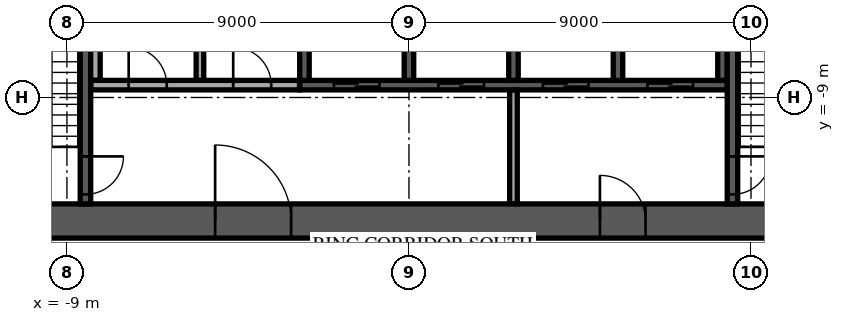
"""IFC4 building model, lengths in metres.
Left out: names, types, materials, properties, quantities, classifications, styles, units other than length and angle.
Written with IfcOpenShell. Run it as: python <this file> out.ifc"""

import sys

from ifc_helpers import new_model, si_unit, direction, frame, frame_2d, origin, place, context, subcontext, project, spatial, rectangle, extrude, element, fill, save


model = new_model("IFC4")
c1 = context("Model", 3, precision=1e-05, world=origin(), true_north=direction((0.0, 1.0)))
c2 = subcontext(c1, "Body", "Model", "MODEL_VIEW")
j1 = project(units=[si_unit("LENGTHUNIT", "METRE"), si_unit("PLANEANGLEUNIT", "RADIAN")], contexts=[c1])
p1 = place(None, origin())
s1 = spatial("IfcSite", under=j1, at=p1, CompositionType="ELEMENT")
p2 = place(p1, origin())
s2 = spatial("IfcBuilding", under=s1, at=p2, CompositionType="ELEMENT")
p3 = place(p2, frame((0.0, 0.0, 225.3)))
s3 = spatial("IfcBuildingStorey", under=s2, at=p3, CompositionType="ELEMENT", Elevation=225.3)
p4 = place(p3, frame((-12.7, -12.25, 0.0), z_axis=(0.0, 0.0, 1.0), x_axis=(1.0, 0.0, 0.0)))
e1 = element("IfcWall", 1, at=p4, inside=s3, PredefinedType="SHEAR", context=c2, shape_type="SweptSolid", body=[
    extrude(rectangle(XDim=25.4, YDim=0.9, at=frame_2d((12.7, 0.0))), origin(), (0.0, 0.0, 1.0), 3.62),
])
p5 = place(p4, frame((7.6, 0.0, 0.0)))
e2 = element("IfcOpeningElement", 2, at=p5, cuts=e1, PredefinedType="OPENING", context=c2, shape_type="SweptSolid", body=[
    extrude(rectangle(XDim=2.0, YDim=2.1, at=frame_2d((1.0, 1.05))), frame((0.0, 0.46, 0.0), z_axis=(0.0, -1.0, 0.0), x_axis=(1.0, 0.0, 0.0)), (0.0, 0.0, 1.0), 0.92),
])
p6 = place(p4, frame((17.725, 0.0, 0.0)))
e3 = element("IfcOpeningElement", 3, at=p6, cuts=e1, PredefinedType="OPENING", context=c2, shape_type="SweptSolid", body=[
    extrude(rectangle(XDim=1.2, YDim=2.1, at=frame_2d((0.6, 1.05))), frame((0.0, 0.46, 0.0), z_axis=(0.0, -1.0, 0.0), x_axis=(1.0, 0.0, 0.0)), (0.0, 0.0, 1.0), 0.92),
])
p7 = place(p4, frame((1.875, 0.0, 0.0)))
e4 = element("IfcOpeningElement", 4, at=p7, cuts=e1, PredefinedType="OPENING", context=c2, shape_type="SweptSolid", body=[
    extrude(rectangle(XDim=1.2, YDim=2.1, at=frame_2d((0.6, 1.05))), frame((0.0, 0.46, 0.0), z_axis=(0.0, -1.0, 0.0), x_axis=(1.0, 0.0, 0.0)), (0.0, 0.0, 1.0), 0.92),
])
p8 = place(p4, frame((22.325, 0.0, 0.0)))
e5 = element("IfcOpeningElement", 5, at=p8, cuts=e1, PredefinedType="OPENING", context=c2, shape_type="SweptSolid", body=[
    extrude(rectangle(XDim=1.2, YDim=2.1, at=frame_2d((0.6, 1.05))), frame((0.0, 0.46, 0.0), z_axis=(0.0, -1.0, 0.0), x_axis=(1.0, 0.0, 0.0)), (0.0, 0.0, 1.0), 0.92),
])
p9 = place(p3, frame((-2.875, -8.675, 0.0), z_axis=(0.0, 0.0, 1.0), x_axis=(1.0, 0.0, 0.0)))
e6 = element("IfcWall", 6, at=p9, inside=s3, PredefinedType="SOLIDWALL", context=c2, shape_type="SweptSolid", body=[
    extrude(rectangle(XDim=11.25, YDim=0.25, at=frame_2d((5.625, 0.0))), origin(), (0.0, 0.0, 1.0), 3.62),
])
p10 = place(p9, frame((0.9, 0.0, 0.0)))
e7 = element("IfcOpeningElement", 7, at=p10, cuts=e6, PredefinedType="OPENING", context=c2, shape_type="SweptSolid", body=[
    extrude(rectangle(XDim=1.2, YDim=2.1, at=frame_2d((0.6, 1.05))), frame((0.0, 0.135, 0.0), z_axis=(0.0, -1.0, 0.0), x_axis=(1.0, 0.0, 0.0)), (0.0, 0.0, 1.0), 0.27),
])
p11 = place(p9, frame((3.65, 0.0, 0.0)))
e8 = element("IfcOpeningElement", 8, at=p11, cuts=e6, PredefinedType="OPENING", context=c2, shape_type="SweptSolid", body=[
    extrude(rectangle(XDim=1.2, YDim=2.1, at=frame_2d((0.6, 1.05))), frame((0.0, 0.135, 0.0), z_axis=(0.0, -1.0, 0.0), x_axis=(1.0, 0.0, 0.0)), (0.0, 0.0, 1.0), 0.27),
])
p12 = place(p9, frame((6.4, 0.0, 0.0)))
e9 = element("IfcOpeningElement", 9, at=p12, cuts=e6, PredefinedType="OPENING", context=c2, shape_type="SweptSolid", body=[
    extrude(rectangle(XDim=1.2, YDim=2.1, at=frame_2d((0.6, 1.05))), frame((0.0, 0.135, 0.0), z_axis=(0.0, -1.0, 0.0), x_axis=(1.0, 0.0, 0.0)), (0.0, 0.0, 1.0), 0.27),
])
p13 = place(p9, frame((9.15, 0.0, 0.0)))
e10 = element("IfcOpeningElement", 10, at=p13, cuts=e6, PredefinedType="OPENING", context=c2, shape_type="SweptSolid", body=[
    extrude(rectangle(XDim=1.2, YDim=2.1, at=frame_2d((0.6, 1.05))), frame((0.0, 0.135, 0.0), z_axis=(0.0, -1.0, 0.0), x_axis=(1.0, 0.0, 0.0)), (0.0, 0.0, 1.0), 0.27),
])
for number, where, z_axis, x_axis in (
    (11, (-2.75, -8.55, 0.0), (0.0, 0.0, 1.0), (0.0, 1.0, 0.0)),
    (12, (0.0, -8.55, 0.0), (0.0, 0.0, 1.0), (0.0, 1.0, 0.0)),
    (13, (2.75, -8.55, 0.0), (0.0, 0.0, 1.0), (0.0, 1.0, 0.0)),
    (14, (5.5, -8.55, 0.0), (0.0, 0.0, 1.0), (0.0, 1.0, 0.0)),
    (15, (8.25, -8.55, 0.0), (0.0, 0.0, 1.0), (0.0, 1.0, 0.0)),
):
    element("IfcWall", number, at=place(p3, frame(where, z_axis=z_axis, x_axis=x_axis)), inside=s3, PredefinedType="SOLIDWALL", context=c2, shape_type="SweptSolid", body=[
        extrude(rectangle(XDim=2.7, YDim=0.25, at=frame_2d((1.35, 0.0))), origin(), (0.0, 0.0, 1.0), 3.62),
    ])
p14 = place(p3, frame((-8.512, -4.55, 0.0), z_axis=(0.0, 0.0, 1.0), x_axis=(0.0, -1.0, 0.0)))
e16 = element("IfcWall", 16, at=p14, inside=s3, PredefinedType="SOLIDWALL", context=c2, shape_type="SweptSolid", body=[
    extrude(rectangle(XDim=7.25, YDim=0.275, at=frame_2d((3.625, 0.0))), origin(), (0.0, 0.0, 1.0), 3.62),
])
p15 = place(p14, frame((6.0, 0.0, 0.0)))
e17 = element("IfcOpeningElement", 17, at=p15, cuts=e16, PredefinedType="OPENING", context=c2, shape_type="SweptSolid", body=[
    extrude(rectangle(XDim=1.0, YDim=2.1, at=frame_2d((0.5, 1.05))), frame((0.0, 0.147, 0.0), z_axis=(0.0, -1.0, 0.0), x_axis=(1.0, 0.0, 0.0)), (0.0, 0.0, 1.0), 0.295),
])
p16 = place(p3, frame((8.512, -4.55, 0.0), z_axis=(0.0, 0.0, 1.0), x_axis=(0.0, -1.0, 0.0)))
e18 = element("IfcWall", 18, at=p16, inside=s3, PredefinedType="SOLIDWALL", context=c2, shape_type="SweptSolid", body=[
    extrude(rectangle(XDim=7.25, YDim=0.275, at=frame_2d((3.625, 0.0))), origin(), (0.0, 0.0, 1.0), 3.62),
])
p17 = place(p16, frame((6.0, 0.0, 0.0)))
e19 = element("IfcOpeningElement", 19, at=p17, cuts=e18, PredefinedType="OPENING", context=c2, shape_type="SweptSolid", body=[
    extrude(rectangle(XDim=1.0, YDim=2.1, at=frame_2d((0.5, 1.05))), frame((0.0, 0.147, 0.0), z_axis=(0.0, -1.0, 0.0), x_axis=(1.0, 0.0, 0.0)), (0.0, 0.0, 1.0), 0.295),
])
p18 = place(p3, frame((2.75, -11.795, 0.0), z_axis=(0.0, 0.0, 1.0), x_axis=(0.0, 1.0, 0.0)))
e20 = element("IfcWall", 20, at=p18, inside=s3, PredefinedType="PARTITIONING", context=c2, shape_type="SweptSolid", body=[
    extrude(rectangle(XDim=2.99, YDim=0.2, at=frame_2d((1.495, 0.0))), origin(), (0.0, 0.0, 1.0), 3.62),
])
p19 = place(p3, frame((-8.37, -8.675, 0.0), z_axis=(0.0, 0.0, 1.0), x_axis=(1.0, 0.0, 0.0)))
e21 = element("IfcWall", 21, at=p19, inside=s3, PredefinedType="PARTITIONING", context=c2, shape_type="SweptSolid", body=[
    extrude(rectangle(XDim=5.49, YDim=0.25, at=frame_2d((2.745, 0.0))), origin(), (0.0, 0.0, 1.0), 3.62),
])
p20 = place(p19, frame((0.995, 0.0, 0.0)))
e22 = element("IfcOpeningElement", 22, at=p20, cuts=e21, PredefinedType="OPENING", context=c2, shape_type="SweptSolid", body=[
    extrude(rectangle(XDim=1.0, YDim=2.1, at=frame_2d((0.5, 1.05))), frame((0.0, 0.135, 0.0), z_axis=(0.0, -1.0, 0.0), x_axis=(1.0, 0.0, 0.0)), (0.0, 0.0, 1.0), 0.27),
])
p21 = place(p19, frame((3.745, 0.0, 0.0)))
e23 = element("IfcOpeningElement", 23, at=p21, cuts=e21, PredefinedType="OPENING", context=c2, shape_type="SweptSolid", body=[
    extrude(rectangle(XDim=1.0, YDim=2.1, at=frame_2d((0.5, 1.05))), frame((0.0, 0.135, 0.0), z_axis=(0.0, -1.0, 0.0), x_axis=(1.0, 0.0, 0.0)), (0.0, 0.0, 1.0), 0.27),
])
p22 = place(p3, frame((-8.25, -8.545, 0.0), z_axis=(0.0, 0.0, 1.0), x_axis=(0.0, 1.0, 0.0)))
e24 = element("IfcWall", 24, at=p22, inside=s3, PredefinedType="PARTITIONING", context=c2, shape_type="SweptSolid", body=[
    extrude(rectangle(XDim=2.69, YDim=0.25, at=frame_2d((1.345, 0.0))), origin(), (0.0, 0.0, 1.0), 3.62),
])
p23 = place(p3, frame((-5.5, -8.545, 0.0), z_axis=(0.0, 0.0, 1.0), x_axis=(0.0, 1.0, 0.0)))
e25 = element("IfcWall", 25, at=p23, inside=s3, PredefinedType="PARTITIONING", context=c2, shape_type="SweptSolid", body=[
    extrude(rectangle(XDim=2.69, YDim=0.2, at=frame_2d((1.345, 0.0))), origin(), (0.0, 0.0, 1.0), 3.62),
])
p24 = place(p3, frame((-33.845, -10.81, 0.0), z_axis=(0.0, 0.0, 1.0), x_axis=(0.777145437972, -0.629321037499, 0.0)))
e26 = element("IfcWall", 26, at=p24, inside=s3, PredefinedType="STANDARD", context=c2, shape_type="SweptSolid", body=[
    extrude(rectangle(XDim=39.0, YDim=0.6, at=frame_2d((19.5, 0.0))), origin(), (0.0, 0.0, 1.0), 3.62),
])
p25 = place(p24, frame((1.217, 0.0, 0.9)))
e27 = element("IfcOpeningElement", 27, at=p25, cuts=e26, PredefinedType="OPENING", context=c2, shape_type="SweptSolid", body=[
    extrude(rectangle(XDim=1.9, YDim=2.1, at=frame_2d((0.95, 1.05))), frame((0.0, 0.31, 0.0), z_axis=(0.0, -1.0, 0.0), x_axis=(1.0, 0.0, 0.0)), (0.0, 0.0, 1.0), 0.62),
])
p26 = place(p24, frame((5.55, 0.0, 0.9)))
e28 = element("IfcOpeningElement", 28, at=p26, cuts=e26, PredefinedType="OPENING", context=c2, shape_type="SweptSolid", body=[
    extrude(rectangle(XDim=1.9, YDim=2.1, at=frame_2d((0.95, 1.05))), frame((0.0, 0.31, 0.0), z_axis=(0.0, -1.0, 0.0), x_axis=(1.0, 0.0, 0.0)), (0.0, 0.0, 1.0), 0.62),
])
p27 = place(p24, frame((9.883, 0.0, 0.9)))
e29 = element("IfcOpeningElement", 29, at=p27, cuts=e26, PredefinedType="OPENING", context=c2, shape_type="SweptSolid", body=[
    extrude(rectangle(XDim=1.9, YDim=2.1, at=frame_2d((0.95, 1.05))), frame((0.0, 0.31, 0.0), z_axis=(0.0, -1.0, 0.0), x_axis=(1.0, 0.0, 0.0)), (0.0, 0.0, 1.0), 0.62),
])
p28 = place(p24, frame((14.217, 0.0, 0.9)))
e30 = element("IfcOpeningElement", 30, at=p28, cuts=e26, PredefinedType="OPENING", context=c2, shape_type="SweptSolid", body=[
    extrude(rectangle(XDim=1.9, YDim=2.1, at=frame_2d((0.95, 1.05))), frame((0.0, 0.31, 0.0), z_axis=(0.0, -1.0, 0.0), x_axis=(1.0, 0.0, 0.0)), (0.0, 0.0, 1.0), 0.62),
])
p29 = place(p24, frame((18.55, 0.0, 0.9)))
e31 = element("IfcOpeningElement", 31, at=p29, cuts=e26, PredefinedType="OPENING", context=c2, shape_type="SweptSolid", body=[
    extrude(rectangle(XDim=1.9, YDim=2.1, at=frame_2d((0.95, 1.05))), frame((0.0, 0.31, 0.0), z_axis=(0.0, -1.0, 0.0), x_axis=(1.0, 0.0, 0.0)), (0.0, 0.0, 1.0), 0.62),
])
p30 = place(p24, frame((22.883, 0.0, 0.9)))
e32 = element("IfcOpeningElement", 32, at=p30, cuts=e26, PredefinedType="OPENING", context=c2, shape_type="SweptSolid", body=[
    extrude(rectangle(XDim=1.9, YDim=2.1, at=frame_2d((0.95, 1.05))), frame((0.0, 0.31, 0.0), z_axis=(0.0, -1.0, 0.0), x_axis=(1.0, 0.0, 0.0)), (0.0, 0.0, 1.0), 0.62),
])
p31 = place(p24, frame((27.217, 0.0, 0.9)))
e33 = element("IfcOpeningElement", 33, at=p31, cuts=e26, PredefinedType="OPENING", context=c2, shape_type="SweptSolid", body=[
    extrude(rectangle(XDim=1.9, YDim=2.1, at=frame_2d((0.95, 1.05))), frame((0.0, 0.31, 0.0), z_axis=(0.0, -1.0, 0.0), x_axis=(1.0, 0.0, 0.0)), (0.0, 0.0, 1.0), 0.62),
])
p32 = place(p24, frame((31.55, 0.0, 0.9)))
e34 = element("IfcOpeningElement", 34, at=p32, cuts=e26, PredefinedType="OPENING", context=c2, shape_type="SweptSolid", body=[
    extrude(rectangle(XDim=1.9, YDim=2.1, at=frame_2d((0.95, 1.05))), frame((0.0, 0.31, 0.0), z_axis=(0.0, -1.0, 0.0), x_axis=(1.0, 0.0, 0.0)), (0.0, 0.0, 1.0), 0.62),
])
p33 = place(p24, frame((35.883, 0.0, 0.9)))
e35 = element("IfcOpeningElement", 35, at=p33, cuts=e26, PredefinedType="OPENING", context=c2, shape_type="SweptSolid", body=[
    extrude(rectangle(XDim=1.9, YDim=2.1, at=frame_2d((0.95, 1.05))), frame((0.0, 0.31, 0.0), z_axis=(0.0, -1.0, 0.0), x_axis=(1.0, 0.0, 0.0)), (0.0, 0.0, 1.0), 0.62),
])
p34 = place(p3, frame((3.777, -34.584, 0.0), z_axis=(0.0, 0.0, 1.0), x_axis=(0.629323778295, 0.777143218508, 0.0)))
e36 = element("IfcWall", 36, at=p34, inside=s3, PredefinedType="STANDARD", context=c2, shape_type="SweptSolid", body=[
    extrude(rectangle(XDim=49.0, YDim=0.6, at=frame_2d((24.5, 0.0))), origin(), (0.0, 0.0, 1.0), 3.62),
])
p35 = place(p34, frame((1.227, 0.0, 0.9)))
e37 = element("IfcOpeningElement", 37, at=p35, cuts=e36, PredefinedType="OPENING", context=c2, shape_type="SweptSolid", body=[
    extrude(rectangle(XDim=2.0, YDim=2.1, at=frame_2d((1.0, 1.05))), frame((0.0, 0.31, 0.0), z_axis=(0.0, -1.0, 0.0), x_axis=(1.0, 0.0, 0.0)), (0.0, 0.0, 1.0), 0.62),
])
p36 = place(p34, frame((5.682, 0.0, 0.9)))
e38 = element("IfcOpeningElement", 38, at=p36, cuts=e36, PredefinedType="OPENING", context=c2, shape_type="SweptSolid", body=[
    extrude(rectangle(XDim=2.0, YDim=2.1, at=frame_2d((1.0, 1.05))), frame((0.0, 0.31, 0.0), z_axis=(0.0, -1.0, 0.0), x_axis=(1.0, 0.0, 0.0)), (0.0, 0.0, 1.0), 0.62),
])
p37 = place(p34, frame((10.136, 0.0, 0.9)))
e39 = element("IfcOpeningElement", 39, at=p37, cuts=e36, PredefinedType="OPENING", context=c2, shape_type="SweptSolid", body=[
    extrude(rectangle(XDim=2.0, YDim=2.1, at=frame_2d((1.0, 1.05))), frame((0.0, 0.31, 0.0), z_axis=(0.0, -1.0, 0.0), x_axis=(1.0, 0.0, 0.0)), (0.0, 0.0, 1.0), 0.62),
])
p38 = place(p34, frame((14.591, 0.0, 0.9)))
e40 = element("IfcOpeningElement", 40, at=p38, cuts=e36, PredefinedType="OPENING", context=c2, shape_type="SweptSolid", body=[
    extrude(rectangle(XDim=2.0, YDim=2.1, at=frame_2d((1.0, 1.05))), frame((0.0, 0.31, 0.0), z_axis=(0.0, -1.0, 0.0), x_axis=(1.0, 0.0, 0.0)), (0.0, 0.0, 1.0), 0.62),
])
p39 = place(p34, frame((19.045, 0.0, 0.9)))
e41 = element("IfcOpeningElement", 41, at=p39, cuts=e36, PredefinedType="OPENING", context=c2, shape_type="SweptSolid", body=[
    extrude(rectangle(XDim=2.0, YDim=2.1, at=frame_2d((1.0, 1.05))), frame((0.0, 0.31, 0.0), z_axis=(0.0, -1.0, 0.0), x_axis=(1.0, 0.0, 0.0)), (0.0, 0.0, 1.0), 0.62),
])
p40 = place(p34, frame((23.5, 0.0, 0.9)))
e42 = element("IfcOpeningElement", 42, at=p40, cuts=e36, PredefinedType="OPENING", context=c2, shape_type="SweptSolid", body=[
    extrude(rectangle(XDim=2.0, YDim=2.1, at=frame_2d((1.0, 1.05))), frame((0.0, 0.31, 0.0), z_axis=(0.0, -1.0, 0.0), x_axis=(1.0, 0.0, 0.0)), (0.0, 0.0, 1.0), 0.62),
])
p41 = place(p34, frame((27.955, 0.0, 0.9)))
e43 = element("IfcOpeningElement", 43, at=p41, cuts=e36, PredefinedType="OPENING", context=c2, shape_type="SweptSolid", body=[
    extrude(rectangle(XDim=2.0, YDim=2.1, at=frame_2d((1.0, 1.05))), frame((0.0, 0.31, 0.0), z_axis=(0.0, -1.0, 0.0), x_axis=(1.0, 0.0, 0.0)), (0.0, 0.0, 1.0), 0.62),
])
p42 = place(p34, frame((32.409, 0.0, 0.9)))
e44 = element("IfcOpeningElement", 44, at=p42, cuts=e36, PredefinedType="OPENING", context=c2, shape_type="SweptSolid", body=[
    extrude(rectangle(XDim=2.0, YDim=2.1, at=frame_2d((1.0, 1.05))), frame((0.0, 0.31, 0.0), z_axis=(0.0, -1.0, 0.0), x_axis=(1.0, 0.0, 0.0)), (0.0, 0.0, 1.0), 0.62),
])
p43 = place(p34, frame((36.864, 0.0, 0.9)))
e45 = element("IfcOpeningElement", 45, at=p43, cuts=e36, PredefinedType="OPENING", context=c2, shape_type="SweptSolid", body=[
    extrude(rectangle(XDim=2.0, YDim=2.1, at=frame_2d((1.0, 1.05))), frame((0.0, 0.31, 0.0), z_axis=(0.0, -1.0, 0.0), x_axis=(1.0, 0.0, 0.0)), (0.0, 0.0, 1.0), 0.62),
])
p44 = place(p34, frame((41.318, 0.0, 0.9)))
e46 = element("IfcOpeningElement", 46, at=p44, cuts=e36, PredefinedType="OPENING", context=c2, shape_type="SweptSolid", body=[
    extrude(rectangle(XDim=2.0, YDim=2.1, at=frame_2d((1.0, 1.05))), frame((0.0, 0.31, 0.0), z_axis=(0.0, -1.0, 0.0), x_axis=(1.0, 0.0, 0.0)), (0.0, 0.0, 1.0), 0.62),
])
p45 = place(p34, frame((45.773, 0.0, 0.9)))
e47 = element("IfcOpeningElement", 47, at=p45, cuts=e36, PredefinedType="OPENING", context=c2, shape_type="SweptSolid", body=[
    extrude(rectangle(XDim=2.0, YDim=2.1, at=frame_2d((1.0, 1.05))), frame((0.0, 0.31, 0.0), z_axis=(0.0, -1.0, 0.0), x_axis=(1.0, 0.0, 0.0)), (0.0, 0.0, 1.0), 0.62),
])
p46 = place(p3, frame((-24.374, -8.878, 0.0), z_axis=(0.0, 0.0, 1.0), x_axis=(0.777132572121, -0.629336925143, 0.0)))
e48 = element("IfcWall", 48, at=p46, inside=s3, PredefinedType="PARTITIONING", context=c2, shape_type="SweptSolid", body=[
    extrude(rectangle(XDim=26.785, YDim=0.15, at=frame_2d((13.393, 0.0))), origin(), (0.0, 0.0, 1.0), 3.17),
])
p47 = place(p46, frame((1.3, 0.0, 0.0)))
e49 = element("IfcOpeningElement", 49, at=p47, cuts=e48, PredefinedType="OPENING", context=c2, shape_type="SweptSolid", body=[
    extrude(rectangle(XDim=1.0, YDim=2.1, at=frame_2d((0.5, 1.05))), frame((0.0, 0.085, 0.0), z_axis=(0.0, -1.0, 0.0), x_axis=(1.0, 0.0, 0.0)), (0.0, 0.0, 1.0), 0.17),
])
p48 = place(p46, frame((5.461, 0.0, 0.0)))
e50 = element("IfcOpeningElement", 50, at=p48, cuts=e48, PredefinedType="OPENING", context=c2, shape_type="SweptSolid", body=[
    extrude(rectangle(XDim=1.0, YDim=2.1, at=frame_2d((0.5, 1.05))), frame((0.0, 0.085, 0.0), z_axis=(0.0, -1.0, 0.0), x_axis=(1.0, 0.0, 0.0)), (0.0, 0.0, 1.0), 0.17),
])
p49 = place(p46, frame((11.587, 0.0, 0.0)))
e51 = element("IfcOpeningElement", 51, at=p49, cuts=e48, PredefinedType="OPENING", context=c2, shape_type="SweptSolid", body=[
    extrude(rectangle(XDim=1.0, YDim=2.1, at=frame_2d((0.5, 1.05))), frame((0.0, 0.085, 0.0), z_axis=(0.0, -1.0, 0.0), x_axis=(1.0, 0.0, 0.0)), (0.0, 0.0, 1.0), 0.17),
])
p50 = place(p3, frame((3.18, -26.643, 0.0), z_axis=(0.0, 0.0, 1.0), x_axis=(0.629322822444, 0.777143992547, 0.0)))
e52 = element("IfcWall", 52, at=p50, inside=s3, PredefinedType="PARTITIONING", context=c2, shape_type="SweptSolid", body=[
    extrude(rectangle(XDim=37.483, YDim=0.15, at=frame_2d((18.741, 0.0))), origin(), (0.0, 0.0, 1.0), 3.17),
])
p51 = place(p50, frame((6.346, 0.0, 0.0)))
e53 = element("IfcOpeningElement", 53, at=p51, cuts=e52, PredefinedType="OPENING", context=c2, shape_type="SweptSolid", body=[
    extrude(rectangle(XDim=1.0, YDim=2.1, at=frame_2d((0.5, 1.05))), frame((0.0, 0.085, 0.0), z_axis=(0.0, -1.0, 0.0), x_axis=(1.0, 0.0, 0.0)), (0.0, 0.0, 1.0), 0.17),
])
p52 = place(p50, frame((16.452, 0.0, 0.0)))
e54 = element("IfcOpeningElement", 54, at=p52, cuts=e52, PredefinedType="OPENING", context=c2, shape_type="SweptSolid", body=[
    extrude(rectangle(XDim=1.0, YDim=2.1, at=frame_2d((0.5, 1.05))), frame((0.0, 0.085, 0.0), z_axis=(0.0, -1.0, 0.0), x_axis=(1.0, 0.0, 0.0)), (0.0, 0.0, 1.0), 0.17),
])
p53 = place(p50, frame((23.4, 0.0, 0.0)))
e55 = element("IfcOpeningElement", 55, at=p53, cuts=e52, PredefinedType="OPENING", context=c2, shape_type="SweptSolid", body=[
    extrude(rectangle(XDim=1.0, YDim=2.1, at=frame_2d((0.5, 1.05))), frame((0.0, 0.085, 0.0), z_axis=(0.0, -1.0, 0.0), x_axis=(1.0, 0.0, 0.0)), (0.0, 0.0, 1.0), 0.17),
])
p54 = place(p5, origin())
e56 = element("IfcDoor", 56, at=p54, inside=s3, OperationType="SINGLE_SWING_LEFT", PredefinedType="DOOR", context=c2, shape_type="SweptSolid", body=[
    extrude(rectangle(XDim=2.0, YDim=2.1, at=frame_2d((1.0, 1.05))), frame((0.0, 0.025, 0.0), z_axis=(0.0, -1.0, 0.0), x_axis=(1.0, 0.0, 0.0)), (0.0, 0.0, 1.0), 0.05),
])
fill(e2, e56)
p55 = place(p6, origin())
e57 = element("IfcDoor", 57, at=p55, inside=s3, OperationType="SINGLE_SWING_LEFT", PredefinedType="DOOR", context=c2, shape_type="SweptSolid", body=[
    extrude(rectangle(XDim=1.2, YDim=2.1, at=frame_2d((0.6, 1.05))), frame((0.0, 0.025, 0.0), z_axis=(0.0, -1.0, 0.0), x_axis=(1.0, 0.0, 0.0)), (0.0, 0.0, 1.0), 0.05),
])
fill(e3, e57)
p56 = place(p10, origin())
e58 = element("IfcDoor", 58, at=p56, inside=s3, OperationType="DOUBLE_DOOR_SLIDING", PredefinedType="DOOR", context=c2, shape_type="SweptSolid", body=[
    extrude(rectangle(XDim=1.2, YDim=2.1, at=frame_2d((0.6, 1.05))), frame((0.0, 0.025, 0.0), z_axis=(0.0, -1.0, 0.0), x_axis=(1.0, 0.0, 0.0)), (0.0, 0.0, 1.0), 0.05),
])
fill(e7, e58)
p57 = place(p11, origin())
e59 = element("IfcDoor", 59, at=p57, inside=s3, OperationType="DOUBLE_DOOR_SLIDING", PredefinedType="DOOR", context=c2, shape_type="SweptSolid", body=[
    extrude(rectangle(XDim=1.2, YDim=2.1, at=frame_2d((0.6, 1.05))), frame((0.0, 0.025, 0.0), z_axis=(0.0, -1.0, 0.0), x_axis=(1.0, 0.0, 0.0)), (0.0, 0.0, 1.0), 0.05),
])
fill(e8, e59)
p58 = place(p12, origin())
e60 = element("IfcDoor", 60, at=p58, inside=s3, OperationType="DOUBLE_DOOR_SLIDING", PredefinedType="DOOR", context=c2, shape_type="SweptSolid", body=[
    extrude(rectangle(XDim=1.2, YDim=2.1, at=frame_2d((0.6, 1.05))), frame((0.0, 0.025, 0.0), z_axis=(0.0, -1.0, 0.0), x_axis=(1.0, 0.0, 0.0)), (0.0, 0.0, 1.0), 0.05),
])
fill(e9, e60)
p59 = place(p13, origin())
e61 = element("IfcDoor", 61, at=p59, inside=s3, OperationType="DOUBLE_DOOR_SLIDING", PredefinedType="DOOR", context=c2, shape_type="SweptSolid", body=[
    extrude(rectangle(XDim=1.2, YDim=2.1, at=frame_2d((0.6, 1.05))), frame((0.0, 0.025, 0.0), z_axis=(0.0, -1.0, 0.0), x_axis=(1.0, 0.0, 0.0)), (0.0, 0.0, 1.0), 0.05),
])
fill(e10, e61)
p60 = place(p15, origin())
e62 = element("IfcDoor", 62, at=p60, inside=s3, OperationType="SINGLE_SWING_LEFT", PredefinedType="DOOR", context=c2, shape_type="SweptSolid", body=[
    extrude(rectangle(XDim=1.0, YDim=2.1, at=frame_2d((0.5, 1.05))), frame((0.0, 0.025, 0.0), z_axis=(0.0, -1.0, 0.0), x_axis=(1.0, 0.0, 0.0)), (0.0, 0.0, 1.0), 0.05),
])
fill(e17, e62)
p61 = place(p17, origin())
e63 = element("IfcDoor", 63, at=p61, inside=s3, OperationType="SINGLE_SWING_LEFT", PredefinedType="DOOR", context=c2, shape_type="SweptSolid", body=[
    extrude(rectangle(XDim=1.0, YDim=2.1, at=frame_2d((0.5, 1.05))), frame((0.0, 0.025, 0.0), z_axis=(0.0, -1.0, 0.0), x_axis=(1.0, 0.0, 0.0)), (0.0, 0.0, 1.0), 0.05),
])
fill(e19, e63)
p62 = place(p20, origin())
e64 = element("IfcDoor", 64, at=p62, inside=s3, OperationType="SINGLE_SWING_RIGHT", PredefinedType="DOOR", context=c2, shape_type="SweptSolid", body=[
    extrude(rectangle(XDim=1.0, YDim=2.1, at=frame_2d((0.5, 1.05))), frame((0.0, 0.025, 0.0), z_axis=(0.0, -1.0, 0.0), x_axis=(1.0, 0.0, 0.0)), (0.0, 0.0, 1.0), 0.05),
])
fill(e22, e64)
p63 = place(p21, origin())
e65 = element("IfcDoor", 65, at=p63, inside=s3, OperationType="SINGLE_SWING_RIGHT", PredefinedType="DOOR", context=c2, shape_type="SweptSolid", body=[
    extrude(rectangle(XDim=1.0, YDim=2.1, at=frame_2d((0.5, 1.05))), frame((0.0, 0.025, 0.0), z_axis=(0.0, -1.0, 0.0), x_axis=(1.0, 0.0, 0.0)), (0.0, 0.0, 1.0), 0.05),
])
fill(e23, e65)
save(model, sys.argv[1])
